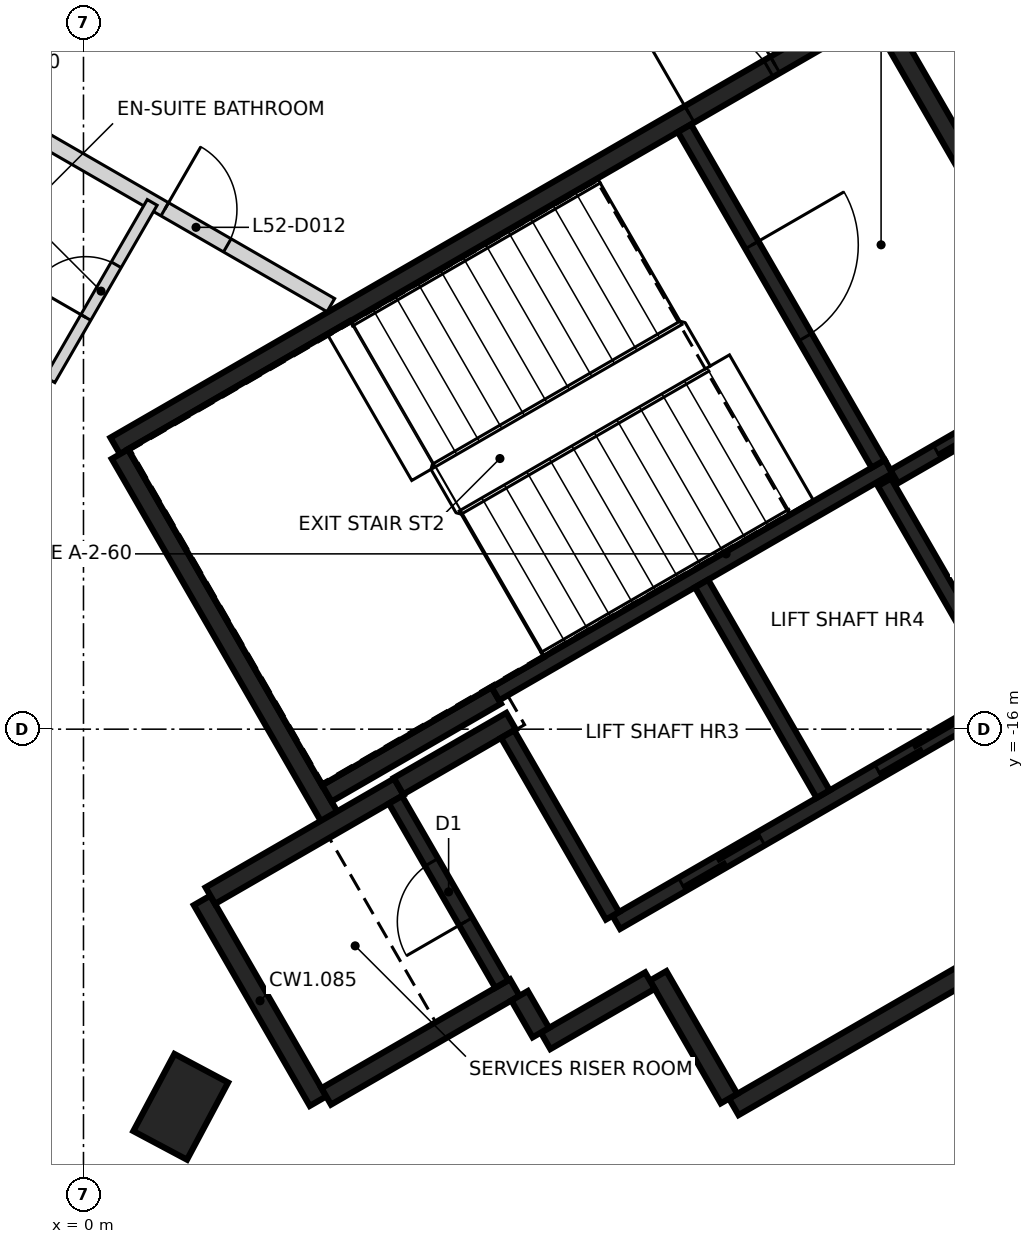
"""IFC4 building model, lengths in metres.
Left out: names, types, materials, properties, quantities, classifications, styles, units other than length and angle.
Written with IfcOpenShell. Run it as: python <this file> out.ifc"""

import sys

from ifc_helpers import new_model, si_unit, direction, frame, frame_2d, origin, origin_2d, place, context, subcontext, project, spatial, rectangle, extrude, element, fill, save


model = new_model("IFC4")
c1 = context("Model", 3, precision=1e-05, world=origin(), true_north=direction((0.0, 1.0)))
c2 = subcontext(c1, "Body", "Model", "MODEL_VIEW")
j1 = project(units=[si_unit("LENGTHUNIT", "METRE"), si_unit("PLANEANGLEUNIT", "RADIAN")], contexts=[c1])
p1 = place(None, origin())
s1 = spatial("IfcSite", under=j1, at=p1, CompositionType="ELEMENT")
p2 = place(p1, origin())
s2 = spatial("IfcBuilding", under=s1, at=p2, CompositionType="ELEMENT")
p3 = place(p2, frame((0.0, 0.0, 208.0)))
s3 = spatial("IfcBuildingStorey", under=s2, at=p3, CompositionType="ELEMENT", Elevation=208.0)
p4 = place(p3, frame((1.279, -20.968, -0.35), z_axis=(0.0, 0.0, 1.0), x_axis=(0.470001593924, 0.882665566174, 0.0)))
e1 = element("IfcColumn", 1, at=p4, inside=s3, PredefinedType="COLUMN", context=c2, shape_type="SweptSolid", body=[
    extrude(rectangle(XDim=1.15, YDim=0.8, at=origin_2d()), origin(), (0.0, 0.0, 1.0), 2.736),
])
p5 = place(p3, frame((0.417, -12.273, 0.0), z_axis=(0.0, 0.0, 1.0), x_axis=(0.866021906294, 0.500006057782, 0.0)))
e2 = element("IfcWall", 2, at=p5, inside=s3, PredefinedType="SHEAR", context=c2, shape_type="SweptSolid", body=[
    extrude(rectangle(XDim=11.55, YDim=0.25, at=frame_2d((5.775, 0.0))), origin(), (0.0, 0.0, 1.0), 3.2),
])
p6 = place(p5, frame((10.025, 0.0, 0.0)))
e3 = element("IfcOpeningElement", 3, at=p6, cuts=e2, PredefinedType="OPENING", context=c2, shape_type="SweptSolid", body=[
    extrude(rectangle(XDim=1.2, YDim=2.1, at=frame_2d((0.6, 1.05))), frame((0.0, 0.135, 0.0), z_axis=(0.0, -1.0, 0.0), x_axis=(1.0, 0.0, 0.0)), (0.0, 0.0, 1.0), 0.27),
])
p7 = place(p5, frame((8.725, 0.0, 0.0)))
e4 = element("IfcOpeningElement", 4, at=p7, cuts=e2, PredefinedType="OPENING", context=c2, shape_type="SweptSolid", body=[
    extrude(rectangle(XDim=1.2, YDim=2.1, at=frame_2d((0.6, 1.05))), frame((0.0, 0.135, 0.0), z_axis=(0.0, -1.0, 0.0), x_axis=(1.0, 0.0, 0.0)), (0.0, 0.0, 1.0), 0.27),
])
p8 = place(p3, frame((16.133, -16.594, 0.0), z_axis=(0.0, 0.0, 1.0), x_axis=(-0.866022959057, -0.500004234368, 0.0)))
e5 = element("IfcWall", 5, at=p8, inside=s3, PredefinedType="SHEAR", context=c2, shape_type="SweptSolid", body=[
    extrude(rectangle(XDim=8.75, YDim=0.25, at=frame_2d((4.375, 0.0))), origin(), (0.0, 0.0, 1.0), 3.2),
])
p9 = place(p3, frame((3.235, -17.153, 0.0), z_axis=(0.0, 0.0, 1.0), x_axis=(-0.500008851346, 0.866020293397, 0.0)))
e6 = element("IfcWall", 6, at=p9, inside=s3, PredefinedType="SHEAR", context=c2, shape_type="SweptSolid", body=[
    extrude(rectangle(XDim=5.51, YDim=0.25, at=frame_2d((2.755, 0.0))), origin(), (0.0, 0.0, 1.0), 3.2),
])
p10 = place(p3, frame((10.483, -6.606, 0.0), z_axis=(0.0, 0.0, 1.0), x_axis=(0.49999885962, -0.866026062182, 0.0)))
e7 = element("IfcWall", 7, at=p10, inside=s3, PredefinedType="SHEAR", context=c2, shape_type="SweptSolid", body=[
    extrude(rectangle(XDim=5.225, YDim=0.25, at=frame_2d((2.612, 0.0))), origin(), (0.0, 0.0, 1.0), 3.2),
])
p11 = place(p3, frame((3.085, -20.894, 0.0), z_axis=(0.0, 0.0, 1.0), x_axis=(-0.499978833458, 0.866037623948, 0.0)))
e8 = element("IfcWall", 8, at=p11, inside=s3, PredefinedType="SHEAR", context=c2, shape_type="SweptSolid", body=[
    extrude(rectangle(XDim=3.05, YDim=0.25, at=frame_2d((1.525, 0.0))), origin(), (0.0, 0.0, 1.0), 3.2),
])
p12 = place(p3, frame((1.669, -18.19, 0.0), z_axis=(0.0, 0.0, 1.0), x_axis=(0.866042235819, 0.499970844928, 0.0)))
e9 = element("IfcWall", 9, at=p12, inside=s3, PredefinedType="SHEAR", context=c2, shape_type="SweptSolid", body=[
    extrude(rectangle(XDim=2.865, YDim=0.25, at=frame_2d((1.432, 0.0))), origin(), (0.0, 0.0, 1.0), 3.2),
])
p13 = place(p3, frame((5.675, -19.399, 0.0), z_axis=(0.0, 0.0, 1.0), x_axis=(-0.866026637627, -0.499997862916, 0.0)))
e10 = element("IfcWall", 10, at=p13, inside=s3, PredefinedType="SHEAR", context=c2, shape_type="SweptSolid", body=[
    extrude(rectangle(XDim=2.865, YDim=0.25, at=frame_2d((1.432, 0.0))), origin(), (0.0, 0.0, 1.0), 3.2),
])
p14 = place(p3, frame((5.431, -15.556, 0.0), z_axis=(0.0, 0.0, 1.0), x_axis=(-0.866022940537, -0.500004266446, 0.0)))
e11 = element("IfcWall", 11, at=p14, inside=s3, PredefinedType="SHEAR", context=c2, shape_type="SweptSolid", body=[
    extrude(rectangle(XDim=2.575, YDim=0.25, at=frame_2d((1.287, 0.0))), origin(), (0.0, 0.0, 1.0), 3.2),
])
p15 = place(p3, frame((8.493, -20.86, 0.0), z_axis=(0.0, 0.0, 1.0), x_axis=(-0.500039802285, 0.866002422705, 0.0)))
e12 = element("IfcWall", 12, at=p15, inside=s3, PredefinedType="SHEAR", context=c2, shape_type="SweptSolid", body=[
    extrude(rectangle(XDim=1.865, YDim=0.25, at=frame_2d((0.932, 0.0))), origin(), (0.0, 0.0, 1.0), 3.2),
])
p16 = place(p3, frame((4.145, -16.749, 0.0), z_axis=(0.0, 0.0, 1.0), x_axis=(0.866038183914, 0.499977863513, 0.0)))
e13 = element("IfcWall", 13, at=p16, inside=s3, PredefinedType="SHEAR", context=c2, shape_type="SweptSolid", body=[
    extrude(rectangle(XDim=1.71, YDim=0.25, at=frame_2d((0.855, 0.0))), origin(), (0.0, 0.0, 1.0), 3.2),
])
p17 = place(p3, frame((7.452, -19.308, 0.0), z_axis=(0.0, 0.0, 1.0), x_axis=(-0.866044474677, -0.49996696679, 0.0)))
e14 = element("IfcWall", 14, at=p17, inside=s3, PredefinedType="SHEAR", context=c2, shape_type="SweptSolid", body=[
    extrude(rectangle(XDim=1.584, YDim=0.25, at=frame_2d((0.792, 0.0))), origin(), (0.0, 0.0, 1.0), 3.2),
])
p18 = place(p3, frame((6.017, -19.992, 0.0), z_axis=(0.0, 0.0, 1.0), x_axis=(-0.500364886717, 0.865814633822, 0.0)))
e15 = element("IfcWall", 15, at=p18, inside=s3, PredefinedType="SHEAR", context=c2, shape_type="SweptSolid", body=[
    extrude(rectangle(XDim=0.559, YDim=0.25, at=frame_2d((0.28, 0.0))), origin(), (0.0, 0.0, 1.0), 3.2),
])
p19 = place(p3, frame((5.419, -15.534, 0.0), z_axis=(0.0, 0.0, 1.0), x_axis=(0.866029065029, 0.499993658486, 0.0)))
e16 = element("IfcWall", 16, at=p19, inside=s3, PredefinedType="SHEAR", context=c2, shape_type="SweptSolid", body=[
    extrude(rectangle(XDim=5.974, YDim=0.2, at=frame_2d((2.987, 0.0))), origin(), (0.0, 0.0, 1.0), 3.2),
])
p20 = place(p3, frame((7.01, -18.542, 0.0), z_axis=(0.0, 0.0, 1.0), x_axis=(0.866030299012, 0.499991521122, 0.0)))
e17 = element("IfcWall", 17, at=p20, inside=s3, PredefinedType="SHEAR", context=c2, shape_type="SweptSolid", body=[
    extrude(rectangle(XDim=6.1, YDim=0.2, at=frame_2d((3.05, 0.0))), origin(), (0.0, 0.0, 1.0), 3.2),
])
p21 = place(p20, frame((1.0, 0.0, 0.0)))
e18 = element("IfcOpeningElement", 18, at=p21, cuts=e17, PredefinedType="OPENING", context=c2, shape_type="SweptSolid", body=[
    extrude(rectangle(XDim=1.2, YDim=2.1, at=frame_2d((0.6, 1.05))), frame((0.0, 0.11, 0.0), z_axis=(0.0, -1.0, 0.0), x_axis=(1.0, 0.0, 0.0)), (0.0, 0.0, 1.0), 0.22),
])
p22 = place(p20, frame((3.982, 0.0, 0.0)))
e19 = element("IfcOpeningElement", 19, at=p22, cuts=e17, PredefinedType="OPENING", context=c2, shape_type="SweptSolid", body=[
    extrude(rectangle(XDim=1.2, YDim=2.1, at=frame_2d((0.6, 1.05))), frame((0.0, 0.11, 0.0), z_axis=(0.0, -1.0, 0.0), x_axis=(1.0, 0.0, 0.0)), (0.0, 0.0, 1.0), 0.22),
])
p23 = place(p3, frame((7.906, -8.094, 0.0), z_axis=(0.0, 0.0, 1.0), x_axis=(0.500027839223, -0.866009330205, 0.0)))
e20 = element("IfcWall", 20, at=p23, inside=s3, PredefinedType="SHEAR", context=c2, shape_type="SweptSolid", body=[
    extrude(rectangle(XDim=5.098, YDim=0.2, at=frame_2d((2.549, 0.0))), origin(), (0.0, 0.0, 1.0), 3.2),
])
p24 = place(p23, frame((1.774, 0.0, 0.0)))
e21 = element("IfcOpeningElement", 21, at=p24, cuts=e20, PredefinedType="OPENING", context=c2, shape_type="SweptSolid", body=[
    extrude(rectangle(XDim=1.4, YDim=2.1, at=frame_2d((0.7, 1.05))), frame((0.0, 0.11, 0.0), z_axis=(0.0, -1.0, 0.0), x_axis=(1.0, 0.0, 0.0)), (0.0, 0.0, 1.0), 0.22),
])
p25 = place(p3, frame((8.132, -14.084, 0.0), z_axis=(0.0, 0.0, 1.0), x_axis=(0.499997778408, -0.866026686418, 0.0)))
e22 = element("IfcWall", 22, at=p25, inside=s3, PredefinedType="SHEAR", context=c2, shape_type="SweptSolid", body=[
    extrude(rectangle(XDim=3.198, YDim=0.2, at=frame_2d((1.599, 0.0))), origin(), (0.0, 0.0, 1.0), 3.2),
])
p26 = place(p3, frame((5.503, -19.352, 0.0), z_axis=(0.0, 0.0, 1.0), x_axis=(-0.499986818241, 0.866033014143, 0.0)))
e23 = element("IfcWall", 23, at=p26, inside=s3, PredefinedType="SHEAR", context=c2, shape_type="SweptSolid", body=[
    extrude(rectangle(XDim=2.798, YDim=0.2, at=frame_2d((1.399, 0.0))), origin(), (0.0, 0.0, 1.0), 3.2),
])
p27 = place(p26, frame((0.949, 0.0, 0.0)))
e24 = element("IfcOpeningElement", 24, at=p27, cuts=e23, PredefinedType="OPENING", context=c2, shape_type="SweptSolid", body=[
    extrude(rectangle(XDim=0.9, YDim=2.1, at=frame_2d((0.45, 1.05))), frame((0.0, 0.11, 0.0), z_axis=(0.0, -1.0, 0.0), x_axis=(1.0, 0.0, 0.0)), (0.0, 0.0, 1.0), 0.22),
])
p28 = place(p3, frame((6.96, -18.455, 0.0), z_axis=(0.0, 0.0, 1.0), x_axis=(-0.499926705758, 0.866067716099, 0.0)))
e25 = element("IfcWall", 25, at=p28, inside=s3, PredefinedType="SHEAR", context=c2, shape_type="SweptSolid", body=[
    extrude(rectangle(XDim=2.759, YDim=0.2, at=frame_2d((1.38, 0.0))), origin(), (0.0, 0.0, 1.0), 3.2),
])
p29 = place(p3, frame((12.088, -15.437, 0.0), z_axis=(0.0, 0.0, 1.0), x_axis=(-0.500026960575, 0.86600983753, 0.0)))
e26 = element("IfcWall", 26, at=p29, inside=s3, PredefinedType="SHEAR", context=c2, shape_type="SweptSolid", body=[
    extrude(rectangle(XDim=3.1, YDim=0.2, at=frame_2d((1.55, 0.0))), origin(), (0.0, 0.0, 1.0), 3.2),
])
p30 = place(p3, frame((10.666, -12.678, 0.0), z_axis=(0.0, 0.0, 1.0), x_axis=(0.866018407898, 0.500012117035, 0.0)))
e27 = element("IfcWall", 27, at=p30, inside=s3, PredefinedType="SHEAR", context=c2, shape_type="SweptSolid", body=[
    extrude(rectangle(XDim=2.651, YDim=0.2, at=frame_2d((1.325, 0.0))), origin(), (0.0, 0.0, 1.0), 3.2),
])
p31 = place(p30, frame((0.652, 0.0, 0.0)))
e28 = element("IfcOpeningElement", 28, at=p31, cuts=e27, PredefinedType="OPENING", context=c2, shape_type="SweptSolid", body=[
    extrude(rectangle(XDim=1.3, YDim=2.1, at=frame_2d((0.65, 1.05))), frame((0.0, 0.11, 0.0), z_axis=(0.0, -1.0, 0.0), x_axis=(1.0, 0.0, 0.0)), (0.0, 0.0, 1.0), 0.22),
])
p32 = place(p3, frame((-8.001, -3.926, 0.0), z_axis=(0.0, 0.0, 1.0), x_axis=(0.866131158271, -0.499816783104, 0.0)))
e29 = element("IfcWall", 29, at=p32, inside=s3, PredefinedType="PARTITIONING", context=c2, shape_type="SweptSolid", body=[
    extrude(rectangle(XDim=12.995, YDim=0.2, at=frame_2d((6.498, 0.0))), origin(), (0.0, 0.0, 1.0), 3.2),
])
p33 = place(p32, frame((6.146, 0.0, 0.0)))
e30 = element("IfcOpeningElement", 30, at=p33, cuts=e29, PredefinedType="OPENING", context=c2, shape_type="SweptSolid", body=[
    extrude(rectangle(XDim=0.95, YDim=2.1, at=frame_2d((0.475, 1.05))), frame((0.0, 0.11, 0.0), z_axis=(0.0, -1.0, 0.0), x_axis=(1.0, 0.0, 0.0)), (0.0, 0.0, 1.0), 0.22),
])
p34 = place(p32, frame((10.472, 0.0, 0.0)))
e31 = element("IfcOpeningElement", 31, at=p34, cuts=e29, PredefinedType="OPENING", context=c2, shape_type="SweptSolid", body=[
    extrude(rectangle(XDim=0.95, YDim=2.1, at=frame_2d((0.475, 1.05))), frame((0.0, 0.11, 0.0), z_axis=(0.0, -1.0, 0.0), x_axis=(1.0, 0.0, 0.0)), (0.0, 0.0, 1.0), 0.22),
])
p35 = place(p3, frame((-3.042, -9.906, 0.0), z_axis=(0.0, 0.0, 1.0), x_axis=(0.866009279501, -0.500027927039, 0.0)))
e32 = element("IfcWall", 32, at=p35, inside=s3, PredefinedType="PARTITIONING", context=c2, shape_type="SweptSolid", body=[
    extrude(rectangle(XDim=2.998, YDim=0.15, at=frame_2d((1.499, 0.0))), origin(), (0.0, 0.0, 1.0), 3.2),
])
p36 = place(p3, frame((-0.442, -11.403, 0.0), z_axis=(0.0, 0.0, 1.0), x_axis=(0.499717222117, 0.866188604127, 0.0)))
e33 = element("IfcWall", 33, at=p36, inside=s3, PredefinedType="PARTITIONING", context=c2, shape_type="SweptSolid", body=[
    extrude(rectangle(XDim=2.693, YDim=0.15, at=frame_2d((1.347, 0.0))), origin(), (0.0, 0.0, 1.0), 3.2),
])
p37 = place(p36, frame((0.946, 0.0, 0.0)))
e34 = element("IfcOpeningElement", 34, at=p37, cuts=e33, PredefinedType="OPENING", context=c2, shape_type="SweptSolid", body=[
    extrude(rectangle(XDim=0.8, YDim=2.1, at=frame_2d((0.4, 1.05))), frame((0.0, 0.085, 0.0), z_axis=(0.0, -1.0, 0.0), x_axis=(1.0, 0.0, 0.0)), (0.0, 0.0, 1.0), 0.17),
])
p38 = place(p31, origin())
e35 = element("IfcDoor", 35, at=p38, inside=s3, OperationType="SLIDING_TO_LEFT", PredefinedType="DOOR", context=c2, shape_type="SweptSolid", body=[
    extrude(rectangle(XDim=1.3, YDim=2.1, at=frame_2d((0.65, 1.05))), frame((0.0, 0.025, 0.0), z_axis=(0.0, -1.0, 0.0), x_axis=(1.0, 0.0, 0.0)), (0.0, 0.0, 1.0), 0.05),
])
fill(e28, e35)
p39 = place(p21, origin())
e36 = element("IfcDoor", 36, at=p39, inside=s3, OperationType="DOUBLE_DOOR_SLIDING", PredefinedType="DOOR", context=c2, shape_type="SweptSolid", body=[
    extrude(rectangle(XDim=1.2, YDim=2.1, at=frame_2d((0.6, 1.05))), frame((0.0, 0.025, 0.0), z_axis=(0.0, -1.0, 0.0), x_axis=(1.0, 0.0, 0.0)), (0.0, 0.0, 1.0), 0.05),
])
fill(e18, e36)
p40 = place(p22, origin())
e37 = element("IfcDoor", 37, at=p40, inside=s3, OperationType="DOUBLE_DOOR_SLIDING", PredefinedType="DOOR", context=c2, shape_type="SweptSolid", body=[
    extrude(rectangle(XDim=1.2, YDim=2.1, at=frame_2d((0.6, 1.05))), frame((0.0, 0.025, 0.0), z_axis=(0.0, -1.0, 0.0), x_axis=(1.0, 0.0, 0.0)), (0.0, 0.0, 1.0), 0.05),
])
fill(e19, e37)
p41 = place(p6, origin())
e38 = element("IfcDoor", 38, at=p41, inside=s3, OperationType="SINGLE_SWING_LEFT", PredefinedType="DOOR", context=c2, shape_type="SweptSolid", body=[
    extrude(rectangle(XDim=1.2, YDim=2.1, at=frame_2d((0.6, 1.05))), frame((0.0, 0.025, 0.0), z_axis=(0.0, -1.0, 0.0), x_axis=(1.0, 0.0, 0.0)), (0.0, 0.0, 1.0), 0.05),
])
fill(e3, e38)
p42 = place(p7, origin())
e39 = element("IfcDoor", 39, at=p42, inside=s3, OperationType="SINGLE_SWING_RIGHT", PredefinedType="DOOR", context=c2, shape_type="SweptSolid", body=[
    extrude(rectangle(XDim=1.2, YDim=2.1, at=frame_2d((0.6, 1.05))), frame((0.0, 0.025, 0.0), z_axis=(0.0, -1.0, 0.0), x_axis=(1.0, 0.0, 0.0)), (0.0, 0.0, 1.0), 0.05),
])
fill(e4, e39)
p43 = place(p24, origin())
e40 = element("IfcDoor", 40, at=p43, inside=s3, OperationType="SINGLE_SWING_LEFT", PredefinedType="DOOR", context=c2, shape_type="SweptSolid", body=[
    extrude(rectangle(XDim=1.4, YDim=2.1, at=frame_2d((0.7, 1.05))), frame((0.0, 0.025, 0.0), z_axis=(0.0, -1.0, 0.0), x_axis=(1.0, 0.0, 0.0)), (0.0, 0.0, 1.0), 0.05),
])
fill(e21, e40)
p44 = place(p27, origin())
e41 = element("IfcDoor", 41, at=p44, inside=s3, OperationType="SINGLE_SWING_RIGHT", PredefinedType="DOOR", context=c2, shape_type="SweptSolid", body=[
    extrude(rectangle(XDim=0.9, YDim=2.1, at=frame_2d((0.45, 1.05))), frame((0.0, 0.025, 0.0), z_axis=(0.0, -1.0, 0.0), x_axis=(1.0, 0.0, 0.0)), (0.0, 0.0, 1.0), 0.05),
])
fill(e24, e41)
p45 = place(p34, frame((0.95, 0.0, 0.0), z_axis=(0.0, 0.0, 1.0), x_axis=(-1.0, 0.0, 0.0)))
e42 = element("IfcDoor", 42, at=p45, inside=s3, OperationType="SINGLE_SWING_LEFT", PredefinedType="DOOR", context=c2, shape_type="SweptSolid", body=[
    extrude(rectangle(XDim=0.95, YDim=2.1, at=frame_2d((0.475, 1.05))), frame((0.0, 0.025, 0.0), z_axis=(0.0, -1.0, 0.0), x_axis=(1.0, 0.0, 0.0)), (0.0, 0.0, 1.0), 0.05),
])
fill(e31, e42)
p46 = place(p37, frame((0.8, 0.0, 0.0), z_axis=(0.0, 0.0, 1.0), x_axis=(-1.0, 0.0, 0.0)))
e43 = element("IfcDoor", 43, at=p46, inside=s3, OperationType="SINGLE_SWING_LEFT", PredefinedType="DOOR", context=c2, shape_type="SweptSolid", body=[
    extrude(rectangle(XDim=0.8, YDim=2.1, at=frame_2d((0.4, 1.05))), frame((0.0, 0.025, 0.0), z_axis=(0.0, -1.0, 0.0), x_axis=(1.0, 0.0, 0.0)), (0.0, 0.0, 1.0), 0.05),
])
fill(e34, e43)
save(model, sys.argv[1])
